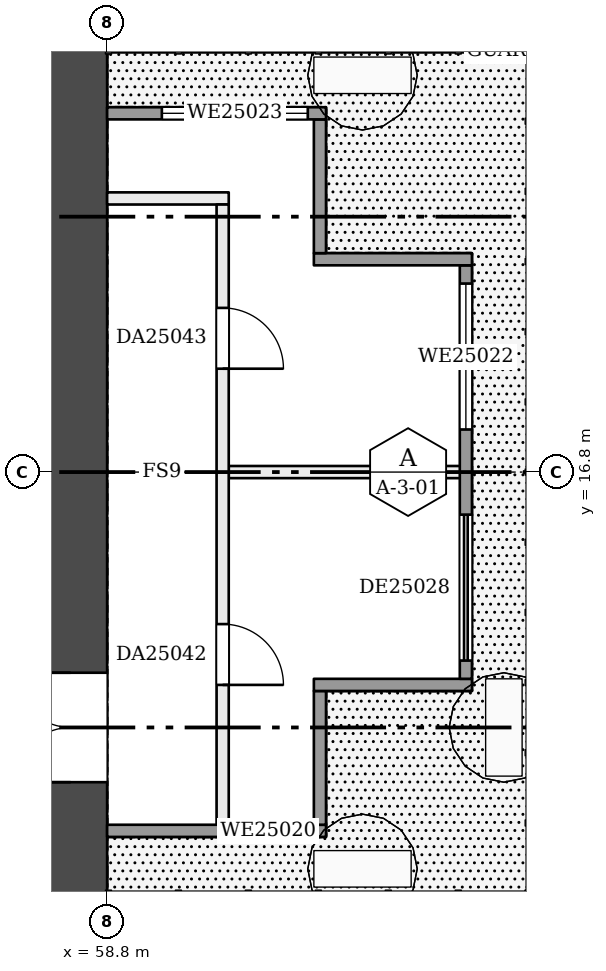
"""IFC4 building model, lengths in metres.
Left out: names, types, materials, properties, quantities, classifications, styles, units other than length and angle.
Written with IfcOpenShell. Run it as: python <this file> out.ifc"""

import sys

from ifc_helpers import new_model, si_unit, direction, frame, frame_2d, origin, place, context, subcontext, project, spatial, rectangle, extrude, element, fill, save


model = new_model("IFC4")
c1 = context("Model", 3, precision=1e-05, world=origin(), true_north=direction((0.0, 1.0)))
c2 = subcontext(c1, "Body", "Model", "MODEL_VIEW")
j1 = project(units=[si_unit("LENGTHUNIT", "METRE"), si_unit("PLANEANGLEUNIT", "RADIAN")], contexts=[c1])
p1 = place(None, origin())
s1 = spatial("IfcSite", under=j1, at=p1, CompositionType="ELEMENT")
p2 = place(p1, origin())
s2 = spatial("IfcBuilding", under=s1, at=p2, CompositionType="ELEMENT")
p3 = place(p2, frame((0.0, 0.0, 102.2)))
s3 = spatial("IfcBuildingStorey", under=s2, at=p3, CompositionType="ELEMENT", Elevation=102.2)
p4 = place(p3, frame((58.2, 9.6, 0.0), z_axis=(0.0, 0.0, 1.0), x_axis=(0.0, 1.0, 0.0)))
e1 = element("IfcWall", 1, at=p4, inside=s3, PredefinedType="SHEAR", context=c2, shape_type="SweptSolid", body=[
    extrude(rectangle(XDim=14.4, YDim=1.2, at=frame_2d((7.2, 0.0))), origin(), (0.0, 0.0, 1.0), 3.22),
])
p5 = place(p4, frame((2.1, 0.0, 0.0)))
e2 = element("IfcOpeningElement", 2, at=p5, cuts=e1, PredefinedType="OPENING", context=c2, shape_type="SweptSolid", body=[
    extrude(rectangle(XDim=1.8, YDim=2.1, at=frame_2d((0.9, 1.05))), frame((0.0, 0.61, 0.0), z_axis=(0.0, -1.0, 0.0), x_axis=(1.0, 0.0, 0.0)), (0.0, 0.0, 1.0), 1.22),
])
p6 = place(p3, frame((60.8, 16.8, 0.0), z_axis=(0.0, 0.0, 1.0), x_axis=(1.0, 0.0, 0.0)))
e3 = element("IfcWall", 3, at=p6, inside=s3, PredefinedType="PARTITIONING", context=c2, shape_type="SweptSolid", body=[
    extrude(rectangle(XDim=3.9, YDim=0.2, at=frame_2d((1.95, 0.0))), origin(), (0.0, 0.0, 1.0), 3.22),
])
p7 = place(p3, frame((58.8, 21.3, 0.0), z_axis=(0.0, 0.0, 1.0), x_axis=(1.0, 0.0, 0.0)))
e4 = element("IfcWall", 4, at=p7, inside=s3, PredefinedType="PARTITIONING", context=c2, shape_type="SweptSolid", body=[
    extrude(rectangle(XDim=2.0, YDim=0.2, at=frame_2d((1.0, 0.0))), origin(), (0.0, 0.0, 1.0), 3.22),
])
p8 = place(p3, frame((60.7, 10.9, 0.0), z_axis=(0.0, 0.0, 1.0), x_axis=(0.0, 1.0, 0.0)))
e5 = element("IfcWall", 5, at=p8, inside=s3, PredefinedType="PARTITIONING", context=c2, shape_type="SweptSolid", body=[
    extrude(rectangle(XDim=10.3, YDim=0.2, at=frame_2d((5.15, 0.0))), origin(), (0.0, 0.0, 1.0), 3.22),
])
p9 = place(p8, frame((2.4, 0.0, 0.0)))
e6 = element("IfcOpeningElement", 6, at=p9, cuts=e5, PredefinedType="OPENING", context=c2, shape_type="SweptSolid", body=[
    extrude(rectangle(XDim=1.0, YDim=2.1, at=frame_2d((0.5, 1.05))), frame((0.0, 0.11, 0.0), z_axis=(0.0, -1.0, 0.0), x_axis=(1.0, 0.0, 0.0)), (0.0, 0.0, 1.0), 0.22),
])
p10 = place(p8, frame((7.6, 0.0, 0.0)))
e7 = element("IfcOpeningElement", 7, at=p10, cuts=e5, PredefinedType="OPENING", context=c2, shape_type="SweptSolid", body=[
    extrude(rectangle(XDim=1.0, YDim=2.1, at=frame_2d((0.5, 1.05))), frame((0.0, 0.11, 0.0), z_axis=(0.0, -1.0, 0.0), x_axis=(1.0, 0.0, 0.0)), (0.0, 0.0, 1.0), 0.22),
])
p11 = place(p3, frame((58.8, 10.9, 0.0), z_axis=(0.0, 0.0, 1.0), x_axis=(1.0, 0.0, 0.0)))
e8 = element("IfcWall", 8, at=p11, inside=s3, PredefinedType="SOLIDWALL", context=c2, shape_type="SweptSolid", body=[
    extrude(rectangle(XDim=3.6, YDim=0.2, at=frame_2d((1.8, 0.0))), origin(), (0.0, 0.0, 1.0), 3.22),
])
p12 = place(p11, frame((2.0, 0.0, 0.9)))
e9 = element("IfcOpeningElement", 9, at=p12, cuts=e8, PredefinedType="OPENING", context=c2, shape_type="SweptSolid", body=[
    extrude(rectangle(XDim=1.3, YDim=1.5, at=frame_2d((0.65, 0.75))), frame((0.0, 0.11, 0.0), z_axis=(0.0, -1.0, 0.0), x_axis=(1.0, 0.0, 0.0)), (0.0, 0.0, 1.0), 0.22),
])
p13 = place(p3, frame((62.3, 11.0, 0.0), z_axis=(0.0, 0.0, 1.0), x_axis=(0.0, 1.0, 0.0)))
e10 = element("IfcWall", 10, at=p13, inside=s3, PredefinedType="SOLIDWALL", context=c2, shape_type="SweptSolid", body=[
    extrude(rectangle(XDim=2.2, YDim=0.2, at=frame_2d((1.1, 0.0))), origin(), (0.0, 0.0, 1.0), 3.22),
])
p14 = place(p3, frame((62.2, 13.3, 0.0), z_axis=(0.0, 0.0, 1.0), x_axis=(1.0, 0.0, 0.0)))
e11 = element("IfcWall", 11, at=p14, inside=s3, PredefinedType="SOLIDWALL", context=c2, shape_type="SweptSolid", body=[
    extrude(rectangle(XDim=2.6, YDim=0.2, at=frame_2d((1.3, 0.0))), origin(), (0.0, 0.0, 1.0), 3.22),
])
p15 = place(p3, frame((64.7, 13.4, 0.0), z_axis=(0.0, 0.0, 1.0), x_axis=(0.0, 1.0, 0.0)))
e12 = element("IfcWall", 12, at=p15, inside=s3, PredefinedType="SOLIDWALL", context=c2, shape_type="SweptSolid", body=[
    extrude(rectangle(XDim=6.8, YDim=0.2, at=frame_2d((3.4, 0.0))), origin(), (0.0, 0.0, 1.0), 3.22),
])
p16 = place(p15, frame((4.1, 0.0, 0.9)))
e13 = element("IfcOpeningElement", 13, at=p16, cuts=e12, PredefinedType="OPENING", context=c2, shape_type="SweptSolid", body=[
    extrude(rectangle(XDim=2.4, YDim=1.5, at=frame_2d((1.2, 0.75))), frame((0.0, 0.11, 0.0), z_axis=(0.0, -1.0, 0.0), x_axis=(1.0, 0.0, 0.0)), (0.0, 0.0, 1.0), 0.22),
])
p17 = place(p15, frame((0.3, 0.0, 0.0)))
e14 = element("IfcOpeningElement", 14, at=p17, cuts=e12, PredefinedType="OPENING", context=c2, shape_type="SweptSolid", body=[
    extrude(rectangle(XDim=2.4, YDim=2.2, at=frame_2d((1.2, 1.1))), frame((0.0, 0.11, 0.0), z_axis=(0.0, -1.0, 0.0), x_axis=(1.0, 0.0, 0.0)), (0.0, 0.0, 1.0), 0.22),
])
p18 = place(p3, frame((64.8, 20.3, 0.0), z_axis=(0.0, 0.0, 1.0), x_axis=(-1.0, 0.0, 0.0)))
e15 = element("IfcWall", 15, at=p18, inside=s3, PredefinedType="SOLIDWALL", context=c2, shape_type="SweptSolid", body=[
    extrude(rectangle(XDim=2.6, YDim=0.2, at=frame_2d((1.3, 0.0))), origin(), (0.0, 0.0, 1.0), 3.22),
])
p19 = place(p3, frame((62.3, 20.4, 0.0), z_axis=(0.0, 0.0, 1.0), x_axis=(0.0, 1.0, 0.0)))
e16 = element("IfcWall", 16, at=p19, inside=s3, PredefinedType="SOLIDWALL", context=c2, shape_type="SweptSolid", body=[
    extrude(rectangle(XDim=2.2, YDim=0.2, at=frame_2d((1.1, 0.0))), origin(), (0.0, 0.0, 1.0), 3.22),
])
p20 = place(p3, frame((62.4, 22.7, 0.0), z_axis=(0.0, 0.0, 1.0), x_axis=(-1.0, 0.0, 0.0)))
e17 = element("IfcWall", 17, at=p20, inside=s3, PredefinedType="SOLIDWALL", context=c2, shape_type="SweptSolid", body=[
    extrude(rectangle(XDim=3.6, YDim=0.2, at=frame_2d((1.8, 0.0))), origin(), (0.0, 0.0, 1.0), 3.22),
])
p21 = place(p20, frame((0.3, 0.0, 0.9)))
e18 = element("IfcOpeningElement", 18, at=p21, cuts=e17, PredefinedType="OPENING", context=c2, shape_type="SweptSolid", body=[
    extrude(rectangle(XDim=2.4, YDim=1.5, at=frame_2d((1.2, 0.75))), frame((0.0, 0.11, 0.0), z_axis=(0.0, -1.0, 0.0), x_axis=(1.0, 0.0, 0.0)), (0.0, 0.0, 1.0), 0.22),
])
p22 = place(p5, origin())
e19 = element("IfcDoor", 19, at=p22, inside=s3, OperationType="DOUBLE_DOOR_SINGLE_SWING", PredefinedType="DOOR", context=c2, shape_type="SweptSolid", body=[
    extrude(rectangle(XDim=1.8, YDim=2.1, at=frame_2d((0.9, 1.05))), frame((0.0, 0.025, 0.0), z_axis=(0.0, -1.0, 0.0), x_axis=(1.0, 0.0, 0.0)), (0.0, 0.0, 1.0), 0.05),
])
fill(e2, e19)
p23 = place(p9, frame((1.0, 0.0, 0.0), z_axis=(0.0, 0.0, 1.0), x_axis=(-1.0, 0.0, 0.0)))
e20 = element("IfcDoor", 20, at=p23, inside=s3, OperationType="SINGLE_SWING_RIGHT", PredefinedType="DOOR", context=c2, shape_type="SweptSolid", body=[
    extrude(rectangle(XDim=1.0, YDim=2.1, at=frame_2d((0.5, 1.05))), frame((0.0, 0.025, 0.0), z_axis=(0.0, -1.0, 0.0), x_axis=(1.0, 0.0, 0.0)), (0.0, 0.0, 1.0), 0.05),
])
fill(e6, e20)
p24 = place(p10, frame((1.0, 0.0, 0.0), z_axis=(0.0, 0.0, 1.0), x_axis=(-1.0, 0.0, 0.0)))
e21 = element("IfcDoor", 21, at=p24, inside=s3, OperationType="SINGLE_SWING_RIGHT", PredefinedType="DOOR", context=c2, shape_type="SweptSolid", body=[
    extrude(rectangle(XDim=1.0, YDim=2.1, at=frame_2d((0.5, 1.05))), frame((0.0, 0.025, 0.0), z_axis=(0.0, -1.0, 0.0), x_axis=(1.0, 0.0, 0.0)), (0.0, 0.0, 1.0), 0.05),
])
fill(e7, e21)
p25 = place(p12, origin())
e22 = element("IfcWindow", 22, at=p25, inside=s3, PartitioningType="SINGLE_PANEL", PredefinedType="WINDOW", context=c2, shape_type="SweptSolid", body=[
    extrude(rectangle(XDim=1.3, YDim=1.5, at=frame_2d((0.65, 0.75))), frame((0.0, 0.03, 0.0), z_axis=(0.0, -1.0, 0.0), x_axis=(1.0, 0.0, 0.0)), (0.0, 0.0, 1.0), 0.06),
])
fill(e9, e22)
p26 = place(p16, origin())
e23 = element("IfcWindow", 23, at=p26, inside=s3, PartitioningType="SINGLE_PANEL", PredefinedType="WINDOW", context=c2, shape_type="SweptSolid", body=[
    extrude(rectangle(XDim=2.4, YDim=1.5, at=frame_2d((1.2, 0.75))), frame((0.0, 0.03, 0.0), z_axis=(0.0, -1.0, 0.0), x_axis=(1.0, 0.0, 0.0)), (0.0, 0.0, 1.0), 0.06),
])
fill(e13, e23)
p27 = place(p21, origin())
e24 = element("IfcWindow", 24, at=p27, inside=s3, PartitioningType="SINGLE_PANEL", PredefinedType="WINDOW", context=c2, shape_type="SweptSolid", body=[
    extrude(rectangle(XDim=2.4, YDim=1.5, at=frame_2d((1.2, 0.75))), frame((0.0, 0.03, 0.0), z_axis=(0.0, -1.0, 0.0), x_axis=(1.0, 0.0, 0.0)), (0.0, 0.0, 1.0), 0.06),
])
fill(e18, e24)
p28 = place(p17, origin())
e25 = element("IfcDoor", 25, at=p28, inside=s3, OperationType="DOUBLE_DOOR_SLIDING", PredefinedType="DOOR", context=c2, shape_type="SweptSolid", body=[
    extrude(rectangle(XDim=2.4, YDim=2.2, at=frame_2d((1.2, 1.1))), frame((0.0, 0.025, 0.0), z_axis=(0.0, -1.0, 0.0), x_axis=(1.0, 0.0, 0.0)), (0.0, 0.0, 1.0), 0.05),
])
fill(e14, e25)
save(model, sys.argv[1])
